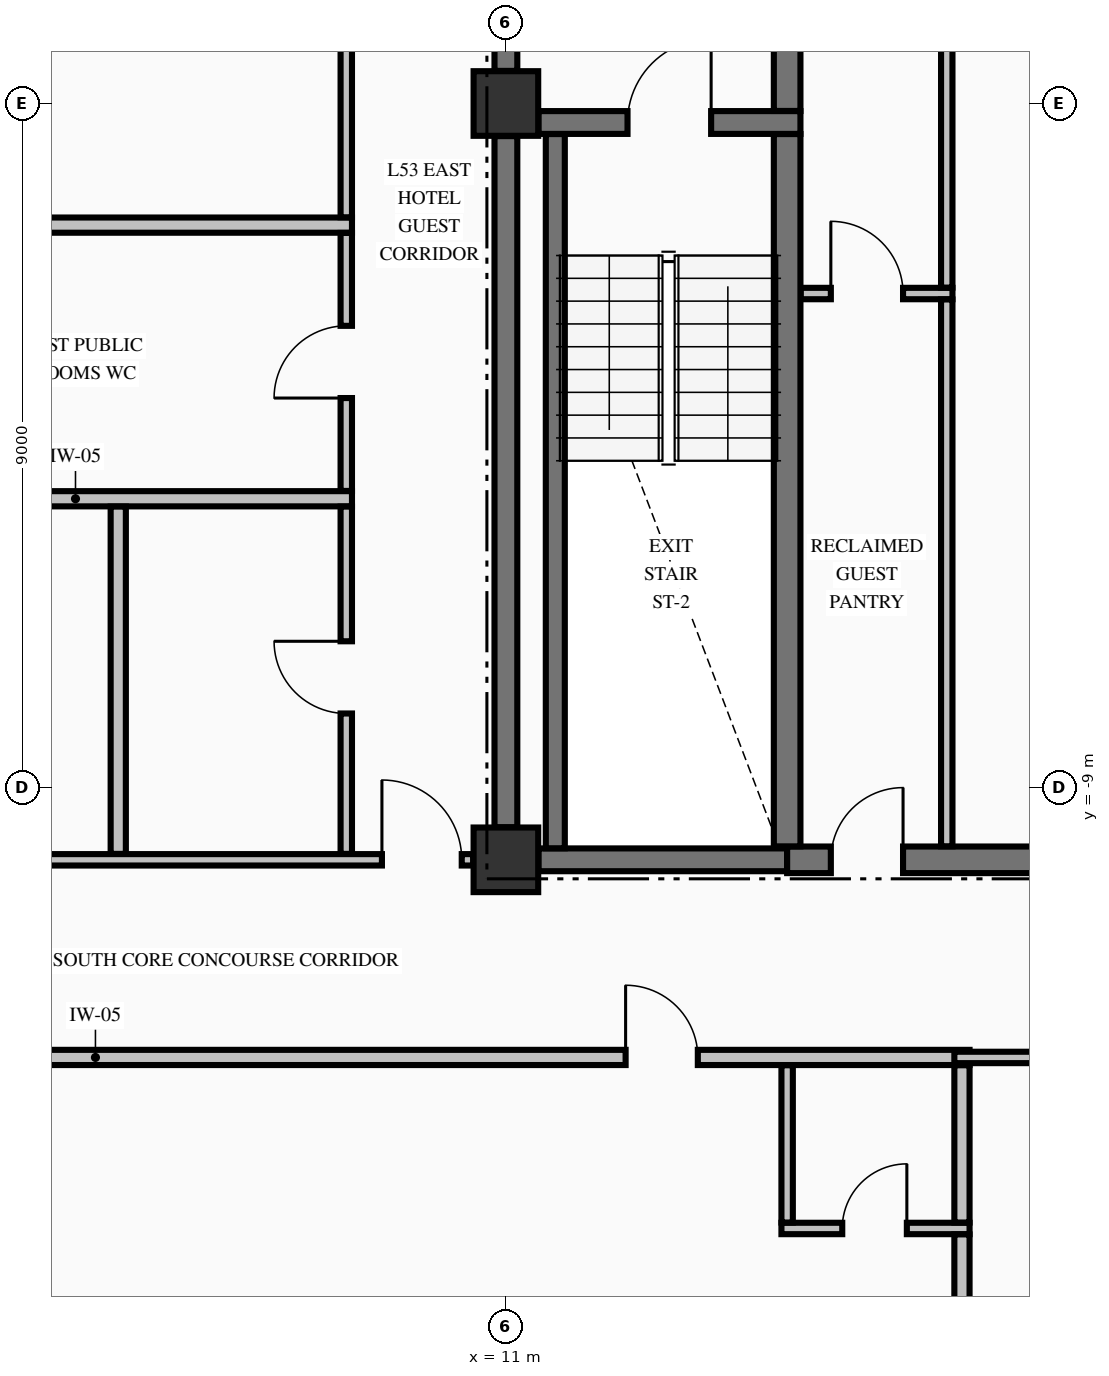
"""IFC4 building model, lengths in metres.
Left out: names, types, materials, properties, quantities, classifications, styles, units other than length and angle.
Written with IfcOpenShell. Run it as: python <this file> out.ifc"""

import sys

from ifc_helpers import new_model, si_unit, direction, frame, frame_2d, origin, origin_2d, place, context, subcontext, project, spatial, rectangle, extrude, element, fill, save


model = new_model("IFC4")
c1 = context("Model", 3, precision=1e-05, world=origin(), true_north=direction((0.0, 1.0)))
c2 = subcontext(c1, "Body", "Model", "MODEL_VIEW")
j1 = project(units=[si_unit("LENGTHUNIT", "METRE"), si_unit("PLANEANGLEUNIT", "RADIAN")], contexts=[c1])
p1 = place(None, origin())
s1 = spatial("IfcSite", under=j1, at=p1, CompositionType="ELEMENT")
p2 = place(p1, origin())
s2 = spatial("IfcBuilding", under=s1, at=p2, CompositionType="ELEMENT")
p3 = place(p2, frame((0.0, 0.0, 205.06)))
s3 = spatial("IfcBuildingStorey", under=s2, at=p3, CompositionType="ELEMENT", Elevation=205.06)
for number, where, z_axis, x_axis in (
    (1, (11.0, -9.95, -0.25), (0.0, 0.0, 1.0), (1.0, 0.0, 0.0)),
    (2, (11.0, 0.0, -0.25), (0.0, 0.0, 1.0), (1.0, 0.0, 0.0)),
):
    element("IfcColumn", number, at=place(p3, frame(where, z_axis=z_axis, x_axis=x_axis)), inside=s3, PredefinedType="COLUMN", context=c2, shape_type="SweptSolid", body=[
        extrude(rectangle(XDim=0.85, YDim=0.85, at=origin_2d()), origin(), (0.0, 0.0, 1.0), 3.4),
    ])
p4 = place(p3, frame((11.429, -9.95, 0.0), z_axis=(0.0, 0.0, 1.0), x_axis=(1.0, 0.0, 0.0)))
e3 = element("IfcWall", 3, at=p4, inside=s3, PredefinedType="SHEAR", context=c2, shape_type="SweptSolid", body=[
    extrude(rectangle(XDim=3.271, YDim=0.3, at=frame_2d((1.635, 0.0))), origin(), (0.0, 0.0, 1.0), 3.15),
])
p5 = place(p3, frame((14.7, -9.95, 0.0), z_axis=(0.0, 0.0, 1.0), x_axis=(1.0, 0.0, 0.0)))
e4 = element("IfcWall", 4, at=p5, inside=s3, PredefinedType="SHEAR", context=c2, shape_type="SweptSolid", body=[
    extrude(rectangle(XDim=4.871, YDim=0.35, at=frame_2d((2.436, 0.0))), origin(), (0.0, 0.0, 1.0), 3.15),
])
p6 = place(p5, frame((3.25, 0.0, 0.0)))
e5 = element("IfcOpeningElement", 5, at=p6, cuts=e4, PredefinedType="OPENING", context=c2, shape_type="SweptSolid", body=[
    extrude(rectangle(XDim=0.9, YDim=2.15, at=frame_2d((0.45, 1.075))), frame((0.0, 0.185, 0.0), z_axis=(0.0, -1.0, 0.0), x_axis=(1.0, 0.0, 0.0)), (0.0, 0.0, 1.0), 0.37),
])
p7 = place(p5, frame((0.575, 0.0, 0.0)))
e6 = element("IfcOpeningElement", 6, at=p7, cuts=e4, PredefinedType="OPENING", context=c2, shape_type="SweptSolid", body=[
    extrude(rectangle(XDim=0.95, YDim=2.15, at=frame_2d((0.475, 1.075))), frame((0.0, 0.185, 0.0), z_axis=(0.0, -1.0, 0.0), x_axis=(1.0, 0.0, 0.0)), (0.0, 0.0, 1.0), 0.37),
])
p8 = place(p3, frame((11.429, -0.25, 0.0), z_axis=(0.0, 0.0, 1.0), x_axis=(1.0, 0.0, 0.0)))
e7 = element("IfcWall", 7, at=p8, inside=s3, PredefinedType="SHEAR", context=c2, shape_type="SweptSolid", body=[
    extrude(rectangle(XDim=3.446, YDim=0.3, at=frame_2d((1.723, 0.0))), origin(), (0.0, 0.0, 1.0), 3.15),
])
p9 = place(p8, frame((1.171, 0.0, 0.0)))
e8 = element("IfcOpeningElement", 8, at=p9, cuts=e7, PredefinedType="OPENING", context=c2, shape_type="SweptSolid", body=[
    extrude(rectangle(XDim=1.1, YDim=2.15, at=frame_2d((0.55, 1.075))), frame((0.0, 0.16, 0.0), z_axis=(0.0, -1.0, 0.0), x_axis=(1.0, 0.0, 0.0)), (0.0, 0.0, 1.0), 0.32),
])
p10 = place(p3, frame((14.625, -14.8, 0.0), z_axis=(0.0, 0.0, 1.0), x_axis=(1.0, 0.0, 0.0)))
e9 = element("IfcWall", 9, at=p10, inside=s3, PredefinedType="PARTITIONING", context=c2, shape_type="SweptSolid", body=[
    extrude(rectangle(XDim=2.475, YDim=0.15, at=frame_2d((1.238, 0.0))), origin(), (0.0, 0.0, 1.0), 3.15),
])
p11 = place(p10, frame((0.8, 0.0, 0.0)))
e10 = element("IfcOpeningElement", 10, at=p11, cuts=e9, PredefinedType="OPENING", context=c2, shape_type="SweptSolid", body=[
    extrude(rectangle(XDim=0.85, YDim=2.1, at=frame_2d((0.425, 1.05))), frame((0.0, 0.085, 0.0), z_axis=(0.0, -1.0, 0.0), x_axis=(1.0, 0.0, 0.0)), (0.0, 0.0, 1.0), 0.17),
])
p12 = place(p3, frame((-22.1, -12.55, 0.0), z_axis=(0.0, 0.0, 1.0), x_axis=(1.0, 0.0, 0.0)))
e11 = element("IfcWall", 11, at=p12, inside=s3, PredefinedType="PARTITIONING", context=c2, shape_type="SweptSolid", body=[
    extrude(rectangle(XDim=39.2, YDim=0.2, at=frame_2d((19.6, 0.0))), origin(), (0.0, 0.0, 1.0), 3.15),
])
p13 = place(p12, frame((3.525, 0.0, 0.0)))
e12 = element("IfcOpeningElement", 12, at=p13, cuts=e11, PredefinedType="OPENING", context=c2, shape_type="SweptSolid", body=[
    extrude(rectangle(XDim=0.95, YDim=2.15, at=frame_2d((0.475, 1.075))), frame((0.0, 0.11, 0.0), z_axis=(0.0, -1.0, 0.0), x_axis=(1.0, 0.0, 0.0)), (0.0, 0.0, 1.0), 0.22),
])
p14 = place(p12, frame((11.475, 0.0, 0.0)))
e13 = element("IfcOpeningElement", 13, at=p14, cuts=e11, PredefinedType="OPENING", context=c2, shape_type="SweptSolid", body=[
    extrude(rectangle(XDim=0.95, YDim=2.15, at=frame_2d((0.475, 1.075))), frame((0.0, 0.11, 0.0), z_axis=(0.0, -1.0, 0.0), x_axis=(1.0, 0.0, 0.0)), (0.0, 0.0, 1.0), 0.22),
])
p15 = place(p12, frame((19.775, 0.0, 0.0)))
e14 = element("IfcOpeningElement", 14, at=p15, cuts=e11, PredefinedType="OPENING", context=c2, shape_type="SweptSolid", body=[
    extrude(rectangle(XDim=0.95, YDim=2.15, at=frame_2d((0.475, 1.075))), frame((0.0, 0.11, 0.0), z_axis=(0.0, -1.0, 0.0), x_axis=(1.0, 0.0, 0.0)), (0.0, 0.0, 1.0), 0.22),
])
p16 = place(p12, frame((34.675, 0.0, 0.0)))
e15 = element("IfcOpeningElement", 15, at=p16, cuts=e11, PredefinedType="OPENING", context=c2, shape_type="SweptSolid", body=[
    extrude(rectangle(XDim=0.95, YDim=2.15, at=frame_2d((0.475, 1.075))), frame((0.0, 0.11, 0.0), z_axis=(0.0, -1.0, 0.0), x_axis=(1.0, 0.0, 0.0)), (0.0, 0.0, 1.0), 0.22),
])
p17 = place(p3, frame((16.9, -12.55, 0.0), z_axis=(0.0, 0.0, 1.0), x_axis=(1.0, 0.0, 0.0)))
e16 = element("IfcWall", 16, at=p17, inside=s3, PredefinedType="PARTITIONING", context=c2, shape_type="SweptSolid", body=[
    extrude(rectangle(XDim=3.175, YDim=0.15, at=frame_2d((1.587, 0.0))), origin(), (0.0, 0.0, 1.0), 3.15),
])
p18 = place(p3, frame((-10.569, -9.95, 0.0), z_axis=(0.0, 0.0, 1.0), x_axis=(1.0, 0.0, 0.0)))
e17 = element("IfcWall", 17, at=p18, inside=s3, PredefinedType="PARTITIONING", context=c2, shape_type="SweptSolid", body=[
    extrude(rectangle(XDim=21.138, YDim=0.15, at=frame_2d((10.569, 0.0))), origin(), (0.0, 0.0, 1.0), 3.15),
])
p19 = place(p18, frame((0.15, 0.0, 0.0)))
e18 = element("IfcOpeningElement", 18, at=p19, cuts=e17, PredefinedType="OPENING", context=c2, shape_type="SweptSolid", body=[
    extrude(rectangle(XDim=1.05, YDim=2.15, at=frame_2d((0.525, 1.075))), frame((0.0, 0.085, 0.0), z_axis=(0.0, -1.0, 0.0), x_axis=(1.0, 0.0, 0.0)), (0.0, 0.0, 1.0), 0.17),
])
p20 = place(p18, frame((19.938, 0.0, 0.0)))
e19 = element("IfcOpeningElement", 19, at=p20, cuts=e17, PredefinedType="OPENING", context=c2, shape_type="SweptSolid", body=[
    extrude(rectangle(XDim=1.05, YDim=2.15, at=frame_2d((0.525, 1.075))), frame((0.0, 0.085, 0.0), z_axis=(0.0, -1.0, 0.0), x_axis=(1.0, 0.0, 0.0)), (0.0, 0.0, 1.0), 0.17),
])
p21 = place(p18, frame((13.944, 0.0, 0.0)))
e20 = element("IfcOpeningElement", 20, at=p21, cuts=e17, PredefinedType="OPENING", context=c2, shape_type="SweptSolid", body=[
    extrude(rectangle(XDim=0.95, YDim=2.15, at=frame_2d((0.475, 1.075))), frame((0.0, 0.085, 0.0), z_axis=(0.0, -1.0, 0.0), x_axis=(1.0, 0.0, 0.0)), (0.0, 0.0, 1.0), 0.17),
])
p22 = place(p3, frame((1.7, -5.2, 0.0), z_axis=(0.0, 0.0, 1.0), x_axis=(1.0, 0.0, 0.0)))
e21 = element("IfcWall", 21, at=p22, inside=s3, PredefinedType="PARTITIONING", context=c2, shape_type="SweptSolid", body=[
    extrude(rectangle(XDim=7.275, YDim=0.2, at=frame_2d((3.638, 0.0))), origin(), (0.0, 0.0, 1.0), 3.15),
])
p23 = place(p3, frame((14.878, -2.5, 0.0), z_axis=(0.0, 0.0, 1.0), x_axis=(1.0, 0.0, 0.0)))
e22 = element("IfcWall", 22, at=p23, inside=s3, PredefinedType="PARTITIONING", context=c2, shape_type="SweptSolid", body=[
    extrude(rectangle(XDim=1.997, YDim=0.15, at=frame_2d((0.999, 0.0))), origin(), (0.0, 0.0, 1.0), 3.15),
])
p24 = place(p23, frame((0.397, 0.0, 0.0)))
e23 = element("IfcOpeningElement", 23, at=p24, cuts=e22, PredefinedType="OPENING", context=c2, shape_type="SweptSolid", body=[
    extrude(rectangle(XDim=0.95, YDim=2.15, at=frame_2d((0.475, 1.075))), frame((0.0, 0.085, 0.0), z_axis=(0.0, -1.0, 0.0), x_axis=(1.0, 0.0, 0.0)), (0.0, 0.0, 1.0), 0.17),
])
p25 = place(p3, frame((1.7, -1.6, 0.0), z_axis=(0.0, 0.0, 1.0), x_axis=(1.0, 0.0, 0.0)))
e24 = element("IfcWall", 24, at=p25, inside=s3, PredefinedType="PARTITIONING", context=c2, shape_type="SweptSolid", body=[
    extrude(rectangle(XDim=7.275, YDim=0.2, at=frame_2d((3.638, 0.0))), origin(), (0.0, 0.0, 1.0), 3.15),
])
p26 = place(p3, frame((11.0, -9.521, 0.0), z_axis=(0.0, 0.0, 1.0), x_axis=(0.0, 1.0, 0.0)))
e25 = element("IfcWall", 25, at=p26, inside=s3, PredefinedType="SHEAR", context=c2, shape_type="SweptSolid", body=[
    extrude(rectangle(XDim=9.092, YDim=0.3, at=frame_2d((4.546, 0.0))), origin(), (0.0, 0.0, 1.0), 3.15),
])
p27 = place(p3, frame((11.0, 0.429, 0.0), z_axis=(0.0, 0.0, 1.0), x_axis=(0.0, 1.0, 0.0)))
e26 = element("IfcWall", 26, at=p27, inside=s3, PredefinedType="SHEAR", context=c2, shape_type="SweptSolid", body=[
    extrude(rectangle(XDim=2.319, YDim=0.3, at=frame_2d((1.16, 0.0))), origin(), (0.0, 0.0, 1.0), 3.15),
])
p28 = place(p27, frame((0.671, 0.0, 0.0)))
e27 = element("IfcOpeningElement", 27, at=p28, cuts=e26, PredefinedType="OPENING", context=c2, shape_type="SweptSolid", body=[
    extrude(rectangle(XDim=1.1, YDim=2.15, at=frame_2d((0.55, 1.075))), frame((0.0, 0.16, 0.0), z_axis=(0.0, -1.0, 0.0), x_axis=(1.0, 0.0, 0.0)), (0.0, 0.0, 1.0), 0.32),
])
p29 = place(p3, frame((11.65, -9.798, 0.0), z_axis=(0.0, 0.0, 1.0), x_axis=(0.0, 1.0, 0.0)))
e28 = element("IfcWall", 28, at=p29, inside=s3, PredefinedType="SOLIDWALL", context=c2, shape_type="SweptSolid", body=[
    extrude(rectangle(XDim=9.396, YDim=0.25, at=frame_2d((4.698, 0.0))), origin(), (0.0, 0.0, 1.0), 3.15),
])
p30 = place(p3, frame((14.7, -9.773, 0.0), z_axis=(0.0, 0.0, 1.0), x_axis=(0.0, 1.0, 0.0)))
e29 = element("IfcWall", 29, at=p30, inside=s3, PredefinedType="SHEAR", context=c2, shape_type="SweptSolid", body=[
    extrude(rectangle(XDim=9.371, YDim=0.35, at=frame_2d((4.686, 0.0))), origin(), (0.0, 0.0, 1.0), 3.15),
])
p31 = place(p3, frame((14.7, -0.098, 0.0), z_axis=(0.0, 0.0, 1.0), x_axis=(0.0, 1.0, 0.0)))
e30 = element("IfcWall", 30, at=p31, inside=s3, PredefinedType="SHEAR", context=c2, shape_type="SweptSolid", body=[
    extrude(rectangle(XDim=2.846, YDim=0.35, at=frame_2d((1.423, 0.0))), origin(), (0.0, 0.0, 1.0), 3.15),
])
p32 = place(p3, frame((5.9, -9.872, 0.0), z_axis=(0.0, 0.0, 1.0), x_axis=(0.0, 1.0, 0.0)))
e31 = element("IfcWall", 31, at=p32, inside=s3, PredefinedType="PARTITIONING", context=c2, shape_type="SweptSolid", body=[
    extrude(rectangle(XDim=4.569, YDim=0.2, at=frame_2d((2.285, 0.0))), origin(), (0.0, 0.0, 1.0), 3.15),
])
p33 = place(p3, frame((8.9, -9.872, 0.0), z_axis=(0.0, 0.0, 1.0), x_axis=(0.0, 1.0, 0.0)))
e32 = element("IfcWall", 32, at=p33, inside=s3, PredefinedType="PARTITIONING", context=c2, shape_type="SweptSolid", body=[
    extrude(rectangle(XDim=4.569, YDim=0.15, at=frame_2d((2.285, 0.0))), origin(), (0.0, 0.0, 1.0), 3.15),
])
p34 = place(p33, frame((1.847, 0.0, 0.0)))
e33 = element("IfcOpeningElement", 33, at=p34, cuts=e32, PredefinedType="OPENING", context=c2, shape_type="SweptSolid", body=[
    extrude(rectangle(XDim=0.95, YDim=2.15, at=frame_2d((0.475, 1.075))), frame((0.0, 0.085, 0.0), z_axis=(0.0, -1.0, 0.0), x_axis=(1.0, 0.0, 0.0)), (0.0, 0.0, 1.0), 0.17),
])
p35 = place(p3, frame((8.9, -5.097, 0.0), z_axis=(0.0, 0.0, 1.0), x_axis=(0.0, 1.0, 0.0)))
e34 = element("IfcWall", 34, at=p35, inside=s3, PredefinedType="PARTITIONING", context=c2, shape_type="SweptSolid", body=[
    extrude(rectangle(XDim=3.394, YDim=0.15, at=frame_2d((1.697, 0.0))), origin(), (0.0, 0.0, 1.0), 3.15),
])
p36 = place(p35, frame((1.222, 0.0, 0.0)))
e35 = element("IfcOpeningElement", 35, at=p36, cuts=e34, PredefinedType="OPENING", context=c2, shape_type="SweptSolid", body=[
    extrude(rectangle(XDim=0.95, YDim=2.15, at=frame_2d((0.475, 1.075))), frame((0.0, 0.085, 0.0), z_axis=(0.0, -1.0, 0.0), x_axis=(1.0, 0.0, 0.0)), (0.0, 0.0, 1.0), 0.17),
])
p37 = place(p3, frame((8.9, -1.497, 0.0), z_axis=(0.0, 0.0, 1.0), x_axis=(0.0, 1.0, 0.0)))
e36 = element("IfcWall", 36, at=p37, inside=s3, PredefinedType="PARTITIONING", context=c2, shape_type="SweptSolid", body=[
    extrude(rectangle(XDim=11.919, YDim=0.15, at=frame_2d((5.959, 0.0))), origin(), (0.0, 0.0, 1.0), 3.15),
])
p38 = place(p37, frame((5.397, 0.0, 0.0)))
e37 = element("IfcOpeningElement", 37, at=p38, cuts=e36, PredefinedType="OPENING", context=c2, shape_type="SweptSolid", body=[
    extrude(rectangle(XDim=1.1, YDim=2.15, at=frame_2d((0.55, 1.075))), frame((0.0, 0.085, 0.0), z_axis=(0.0, -1.0, 0.0), x_axis=(1.0, 0.0, 0.0)), (0.0, 0.0, 1.0), 0.17),
])
p39 = place(p3, frame((14.7, -14.722, 0.0), z_axis=(0.0, 0.0, 1.0), x_axis=(0.0, 1.0, 0.0)))
e38 = element("IfcWall", 38, at=p39, inside=s3, PredefinedType="PARTITIONING", context=c2, shape_type="SweptSolid", body=[
    extrude(rectangle(XDim=2.069, YDim=0.15, at=frame_2d((1.034, 0.0))), origin(), (0.0, 0.0, 1.0), 3.15),
])
p40 = place(p3, frame((16.8, -9.772, 0.0), z_axis=(0.0, 0.0, 1.0), x_axis=(0.0, 1.0, 0.0)))
e39 = element("IfcWall", 39, at=p40, inside=s3, PredefinedType="PARTITIONING", context=c2, shape_type="SweptSolid", body=[
    extrude(rectangle(XDim=7.194, YDim=0.15, at=frame_2d((3.597, 0.0))), origin(), (0.0, 0.0, 1.0), 3.15),
])
p41 = place(p3, frame((16.8, -2.422, 0.0), z_axis=(0.0, 0.0, 1.0), x_axis=(0.0, 1.0, 0.0)))
e40 = element("IfcWall", 40, at=p41, inside=s3, PredefinedType="PARTITIONING", context=c2, shape_type="SweptSolid", body=[
    extrude(rectangle(XDim=7.144, YDim=0.15, at=frame_2d((3.572, 0.0))), origin(), (0.0, 0.0, 1.0), 3.15),
])
p42 = place(p3, frame((17.0, -18.994, 0.0), z_axis=(0.0, 0.0, 1.0), x_axis=(0.0, 1.0, 0.0)))
e41 = element("IfcWall", 41, at=p42, inside=s3, PredefinedType="PARTITIONING", context=c2, shape_type="SweptSolid", body=[
    extrude(rectangle(XDim=4.116, YDim=0.2, at=frame_2d((2.058, 0.0))), origin(), (0.0, 0.0, 1.0), 3.15),
])
p43 = place(p3, frame((17.0, -14.722, 0.0), z_axis=(0.0, 0.0, 1.0), x_axis=(0.0, 1.0, 0.0)))
e42 = element("IfcWall", 42, at=p43, inside=s3, PredefinedType="PARTITIONING", context=c2, shape_type="SweptSolid", body=[
    extrude(rectangle(XDim=2.069, YDim=0.2, at=frame_2d((1.034, 0.0))), origin(), (0.0, 0.0, 1.0), 3.15),
])
p44 = place(p9, origin())
e43 = element("IfcDoor", 43, at=p44, inside=s3, OperationType="SINGLE_SWING_RIGHT", PredefinedType="DOOR", context=c2, shape_type="SweptSolid", body=[
    extrude(rectangle(XDim=1.1, YDim=2.15, at=frame_2d((0.55, 1.075))), frame((0.0, 0.025, 0.0), z_axis=(0.0, -1.0, 0.0), x_axis=(1.0, 0.0, 0.0)), (0.0, 0.0, 1.0), 0.05),
])
fill(e8, e43)
p45 = place(p7, origin())
e44 = element("IfcDoor", 44, at=p45, inside=s3, OperationType="SINGLE_SWING_RIGHT", PredefinedType="DOOR", context=c2, shape_type="SweptSolid", body=[
    extrude(rectangle(XDim=0.95, YDim=2.15, at=frame_2d((0.475, 1.075))), frame((0.0, 0.025, 0.0), z_axis=(0.0, -1.0, 0.0), x_axis=(1.0, 0.0, 0.0)), (0.0, 0.0, 1.0), 0.05),
])
fill(e6, e44)
p46 = place(p24, origin())
e45 = element("IfcDoor", 45, at=p46, inside=s3, OperationType="SINGLE_SWING_LEFT", PredefinedType="DOOR", context=c2, shape_type="SweptSolid", body=[
    extrude(rectangle(XDim=0.95, YDim=2.15, at=frame_2d((0.475, 1.075))), frame((0.0, 0.025, 0.0), z_axis=(0.0, -1.0, 0.0), x_axis=(1.0, 0.0, 0.0)), (0.0, 0.0, 1.0), 0.05),
])
fill(e23, e45)
p47 = place(p20, origin())
e46 = element("IfcDoor", 46, at=p47, inside=s3, OperationType="SINGLE_SWING_LEFT", PredefinedType="DOOR", context=c2, shape_type="SweptSolid", body=[
    extrude(rectangle(XDim=1.05, YDim=2.15, at=frame_2d((0.525, 1.075))), frame((0.0, 0.025, 0.0), z_axis=(0.0, -1.0, 0.0), x_axis=(1.0, 0.0, 0.0)), (0.0, 0.0, 1.0), 0.05),
])
fill(e19, e46)
p48 = place(p16, origin())
e47 = element("IfcDoor", 47, at=p48, inside=s3, OperationType="SINGLE_SWING_LEFT", PredefinedType="DOOR", context=c2, shape_type="SweptSolid", body=[
    extrude(rectangle(XDim=0.95, YDim=2.15, at=frame_2d((0.475, 1.075))), frame((0.0, 0.025, 0.0), z_axis=(0.0, -1.0, 0.0), x_axis=(1.0, 0.0, 0.0)), (0.0, 0.0, 1.0), 0.05),
])
fill(e15, e47)
p49 = place(p11, origin())
e48 = element("IfcDoor", 48, at=p49, inside=s3, OperationType="SINGLE_SWING_RIGHT", PredefinedType="DOOR", context=c2, shape_type="SweptSolid", body=[
    extrude(rectangle(XDim=0.85, YDim=2.1, at=frame_2d((0.425, 1.05))), frame((0.0, 0.025, 0.0), z_axis=(0.0, -1.0, 0.0), x_axis=(1.0, 0.0, 0.0)), (0.0, 0.0, 1.0), 0.05),
])
fill(e10, e48)
p50 = place(p36, origin())
e49 = element("IfcDoor", 49, at=p50, inside=s3, OperationType="SINGLE_SWING_LEFT", PredefinedType="DOOR", context=c2, shape_type="SweptSolid", body=[
    extrude(rectangle(XDim=0.95, YDim=2.15, at=frame_2d((0.475, 1.075))), frame((0.0, 0.025, 0.0), z_axis=(0.0, -1.0, 0.0), x_axis=(1.0, 0.0, 0.0)), (0.0, 0.0, 1.0), 0.05),
])
fill(e35, e49)
p51 = place(p34, origin())
e50 = element("IfcDoor", 50, at=p51, inside=s3, OperationType="SINGLE_SWING_RIGHT", PredefinedType="DOOR", context=c2, shape_type="SweptSolid", body=[
    extrude(rectangle(XDim=0.95, YDim=2.15, at=frame_2d((0.475, 1.075))), frame((0.0, 0.025, 0.0), z_axis=(0.0, -1.0, 0.0), x_axis=(1.0, 0.0, 0.0)), (0.0, 0.0, 1.0), 0.05),
])
fill(e33, e50)
save(model, sys.argv[1])
